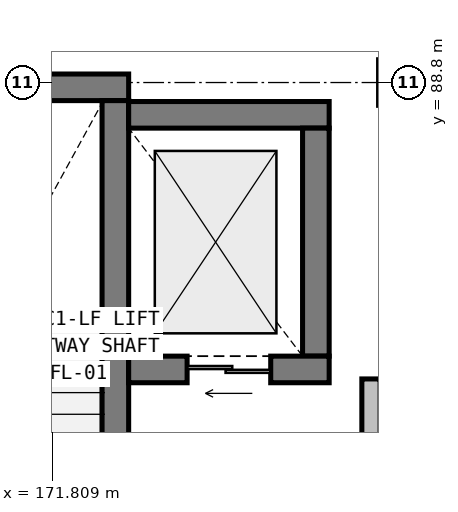
"""IFC4 building model, lengths in metres.
Left out: names, types, materials, properties, quantities, classifications, styles, units other than length and angle.
Written with IfcOpenShell. Run it as: python <this file> out.ifc"""

import sys

from ifc_helpers import new_model, si_unit, direction, frame, frame_2d, origin, origin_2d, place, context, subcontext, project, spatial, rectangle, extrude, element, fill, save


model = new_model("IFC4")
c1 = context("Model", 3, precision=1e-05, world=origin(), true_north=direction((0.0, 1.0)))
c2 = subcontext(c1, "Body", "Model", "MODEL_VIEW")
j1 = project(units=[si_unit("LENGTHUNIT", "METRE"), si_unit("PLANEANGLEUNIT", "RADIAN")], contexts=[c1])
p1 = place(None, origin())
s1 = spatial("IfcSite", under=j1, at=p1, CompositionType="ELEMENT")
p2 = place(p1, origin())
s2 = spatial("IfcBuilding", under=s1, at=p2, CompositionType="ELEMENT")
p3 = place(p2, frame((0.0, 0.0, 16.8)))
s3 = spatial("IfcBuildingStorey", under=s2, at=p3, CompositionType="ELEMENT", Elevation=16.8)
p4 = place(p3, frame((176.4, 88.8, 0.0), z_axis=(0.0, 0.0, 1.0), x_axis=(1.0, 0.0, 0.0)))
e1 = element("IfcColumn", 1, at=p4, inside=s3, PredefinedType="COLUMN", context=c2, shape_type="SweptSolid", body=[
    extrude(rectangle(XDim=0.6, YDim=0.6, at=origin_2d()), origin(), (0.0, 0.0, 1.0), 5.4),
])
p5 = place(p3, frame((168.188, 88.737, 0.0), z_axis=(0.0, 0.0, 1.0), x_axis=(1.0, 0.0, 0.0)))
e2 = element("IfcWall", 2, at=p5, inside=s3, PredefinedType="SHEAR", context=c2, shape_type="SweptSolid", body=[
    extrude(rectangle(XDim=4.624, YDim=0.35, at=frame_2d((2.312, 0.0))), origin(), (0.0, 0.0, 1.0), 5.1),
])
p6 = place(p3, frame((172.637, 88.562, 0.0), z_axis=(0.0, 0.0, 1.0), x_axis=(0.0, -1.0, 0.0)))
e3 = element("IfcWall", 3, at=p6, inside=s3, PredefinedType="SHEAR", context=c2, shape_type="SweptSolid", body=[
    extrude(rectangle(XDim=9.124, YDim=0.35, at=frame_2d((4.562, 0.0))), origin(), (0.0, 0.0, 1.0), 5.1),
])
p7 = place(p3, frame((172.812, 88.375, 0.0), z_axis=(0.0, 0.0, 1.0), x_axis=(1.0, 0.0, 0.0)))
e4 = element("IfcWall", 4, at=p7, inside=s3, PredefinedType="SHEAR", context=c2, shape_type="SweptSolid", body=[
    extrude(rectangle(XDim=2.638, YDim=0.35, at=frame_2d((1.319, 0.0))), origin(), (0.0, 0.0, 1.0), 5.1),
])
p8 = place(p3, frame((175.275, 88.2, 0.0), z_axis=(0.0, 0.0, 1.0), x_axis=(0.0, -1.0, 0.0)))
e5 = element("IfcWall", 5, at=p8, inside=s3, PredefinedType="SHEAR", context=c2, shape_type="SweptSolid", body=[
    extrude(rectangle(XDim=3.0, YDim=0.35, at=frame_2d((1.5, 0.0))), origin(), (0.0, 0.0, 1.0), 5.1),
])
p9 = place(p3, frame((175.45, 85.025, 0.0), z_axis=(0.0, 0.0, 1.0), x_axis=(-1.0, 0.0, 0.0)))
e6 = element("IfcWall", 6, at=p9, inside=s3, PredefinedType="SHEAR", context=c2, shape_type="SweptSolid", body=[
    extrude(rectangle(XDim=2.638, YDim=0.35, at=frame_2d((1.319, 0.0))), origin(), (0.0, 0.0, 1.0), 5.1),
])
p10 = place(p9, frame((0.769, 0.0, 0.0)))
e7 = element("IfcOpeningElement", 7, at=p10, cuts=e6, PredefinedType="OPENING", context=c2, shape_type="SweptSolid", body=[
    extrude(rectangle(XDim=1.1, YDim=2.2, at=frame_2d((0.55, 1.1))), frame((0.0, 0.185, 0.0), z_axis=(0.0, -1.0, 0.0), x_axis=(1.0, 0.0, 0.0)), (0.0, 0.0, 1.0), 0.37),
])
p11 = place(p3, frame((176.0, 84.9, 0.0), z_axis=(0.0, 0.0, 1.0), x_axis=(0.0, -1.0, 0.0)))
e8 = element("IfcWall", 8, at=p11, inside=s3, PredefinedType="PARTITIONING", context=c2, shape_type="SweptSolid", body=[
    extrude(rectangle(XDim=5.5, YDim=0.24, at=frame_2d((2.75, 0.0))), origin(), (0.0, 0.0, 1.0), 4.425),
])
p12 = place(p10, origin())
e9 = element("IfcDoor", 9, at=p12, inside=s3, OperationType="DOUBLE_DOOR_SLIDING", PredefinedType="DOOR", context=c2, shape_type="SweptSolid", body=[
    extrude(rectangle(XDim=1.1, YDim=2.2, at=frame_2d((0.55, 1.1))), frame((0.0, 0.025, 0.0), z_axis=(0.0, -1.0, 0.0), x_axis=(1.0, 0.0, 0.0)), (0.0, 0.0, 1.0), 0.05),
])
fill(e7, e9)
save(model, sys.argv[1])
